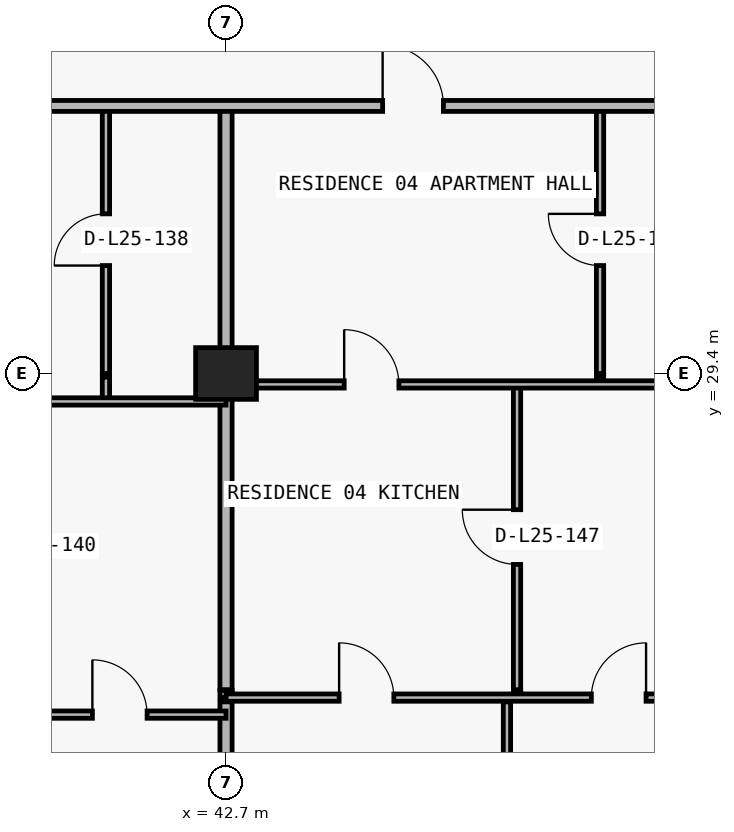
"""IFC4 building model, lengths in metres.
Left out: names, types, materials, properties, quantities, classifications, styles, units other than length and angle.
Written with IfcOpenShell. Run it as: python <this file> out.ifc"""

import sys

from ifc_helpers import new_model, si_unit, direction, frame, frame_2d, origin, origin_2d, place, context, subcontext, project, spatial, rectangle, extrude, element, fill, save


model = new_model("IFC4")
c1 = context("Model", 3, precision=1e-05, world=origin(), true_north=direction((0.0, 1.0)))
c2 = subcontext(c1, "Body", "Model", "MODEL_VIEW")
j1 = project(units=[si_unit("LENGTHUNIT", "METRE"), si_unit("PLANEANGLEUNIT", "RADIAN")], contexts=[c1])
p1 = place(None, origin())
s1 = spatial("IfcSite", under=j1, at=p1, CompositionType="ELEMENT")
p2 = place(p1, origin())
s2 = spatial("IfcBuilding", under=s1, at=p2, CompositionType="ELEMENT")
p3 = place(p2, frame((0.0, 0.0, 94.5)))
s3 = spatial("IfcBuildingStorey", under=s2, at=p3, CompositionType="ELEMENT", Elevation=94.5)
p4 = place(p3, frame((42.7, 29.4, 0.0), z_axis=(0.0, 0.0, 1.0), x_axis=(1.0, 0.0, 0.0)))
e1 = element("IfcColumn", 1, at=p4, inside=s3, PredefinedType="COLUMN", context=c2, shape_type="SweptSolid", body=[
    extrude(rectangle(XDim=1.0, YDim=0.85, at=origin_2d()), origin(), (0.0, 0.0, 1.0), 3.0),
])
p5 = place(p3, frame((40.725, 28.94, 0.0), z_axis=(0.0, 0.0, 1.0), x_axis=(0.0, 1.0, 0.0)))
e2 = element("IfcWall", 2, at=p5, inside=s3, PredefinedType="PARTITIONING", context=c2, shape_type="SweptSolid", body=[
    extrude(rectangle(XDim=0.4, YDim=0.12, at=frame_2d((0.2, 0.0))), origin(), (0.0, 0.0, 1.0), 2.629),
])
p6 = place(p3, frame((40.725, 29.4, 0.0), z_axis=(0.0, 0.0, 1.0), x_axis=(0.0, 1.0, 0.0)))
e3 = element("IfcWall", 3, at=p6, inside=s3, PredefinedType="PARTITIONING", context=c2, shape_type="SweptSolid", body=[
    extrude(rectangle(XDim=4.4, YDim=0.12, at=frame_2d((2.2, 0.0))), origin(), (0.0, 0.0, 1.0), 3.0),
])
p7 = place(p6, frame((1.775, 0.0, 0.0)))
e4 = element("IfcOpeningElement", 4, at=p7, cuts=e3, PredefinedType="OPENING", context=c2, shape_type="SweptSolid", body=[
    extrude(rectangle(XDim=0.85, YDim=2.1, at=frame_2d((0.425, 1.05))), frame((0.0, 0.07, 0.0), z_axis=(0.0, -1.0, 0.0), x_axis=(1.0, 0.0, 0.0)), (0.0, 0.0, 1.0), 0.14),
])
p8 = place(p3, frame((42.7, 8.84, 0.0), z_axis=(0.0, 0.0, 1.0), x_axis=(0.0, 1.0, 0.0)))
e5 = element("IfcWall", 5, at=p8, inside=s3, PredefinedType="PARTITIONING", context=c2, shape_type="SweptSolid", body=[
    extrude(rectangle(XDim=15.16, YDim=0.2, at=frame_2d((7.58, 0.0))), origin(), (0.0, 0.0, 1.0), 2.124),
])
p9 = place(p3, frame((42.7, 24.07, 0.0), z_axis=(0.0, 0.0, 1.0), x_axis=(0.0, 1.0, 0.0)))
e6 = element("IfcWall", 6, at=p9, inside=s3, PredefinedType="PARTITIONING", context=c2, shape_type="SweptSolid", body=[
    extrude(rectangle(XDim=0.12, YDim=0.2, at=frame_2d((0.06, 0.0))), origin(), (0.0, 0.0, 1.0), 2.124),
])
p10 = place(p3, frame((42.7, 24.2, 0.0), z_axis=(0.0, 0.0, 1.0), x_axis=(0.0, 1.0, 0.0)))
e7 = element("IfcWall", 7, at=p10, inside=s3, PredefinedType="PARTITIONING", context=c2, shape_type="SweptSolid", body=[
    extrude(rectangle(XDim=5.14, YDim=0.2, at=frame_2d((2.57, 0.0))), origin(), (0.0, 0.0, 1.0), 2.124),
])
p11 = place(p3, frame((42.7, 29.4, 0.0), z_axis=(0.0, 0.0, 1.0), x_axis=(0.0, 1.0, 0.0)))
e8 = element("IfcWall", 8, at=p11, inside=s3, PredefinedType="PARTITIONING", context=c2, shape_type="SweptSolid", body=[
    extrude(rectangle(XDim=4.4, YDim=0.2, at=frame_2d((2.2, 0.0))), origin(), (0.0, 0.0, 1.0), 2.124),
])
p12 = place(p3, frame((47.32, 8.84, 0.0), z_axis=(0.0, 0.0, 1.0), x_axis=(0.0, 1.0, 0.0)))
e9 = element("IfcWall", 9, at=p12, inside=s3, PredefinedType="PARTITIONING", context=c2, shape_type="SweptSolid", body=[
    extrude(rectangle(XDim=15.16, YDim=0.12, at=frame_2d((7.58, 0.0))), origin(), (0.0, 0.0, 1.0), 3.0),
])
p13 = place(p3, frame((47.486, 24.07, 0.0), z_axis=(0.0, 0.0, 1.0), x_axis=(0.0, 1.0, 0.0)))
e10 = element("IfcWall", 10, at=p13, inside=s3, PredefinedType="PARTITIONING", context=c2, shape_type="SweptSolid", body=[
    extrude(rectangle(XDim=0.12, YDim=0.12, at=frame_2d((0.06, 0.0))), origin(), (0.0, 0.0, 1.0), 3.0),
])
p14 = place(p3, frame((47.486, 24.2, 0.0), z_axis=(0.0, 0.0, 1.0), x_axis=(0.0, 1.0, 0.0)))
e11 = element("IfcWall", 11, at=p14, inside=s3, PredefinedType="PARTITIONING", context=c2, shape_type="SweptSolid", body=[
    extrude(rectangle(XDim=5.02, YDim=0.12, at=frame_2d((2.51, 0.0))), origin(), (0.0, 0.0, 1.0), 3.0),
])
p15 = place(p14, frame((2.06, 0.0, 0.0)))
e12 = element("IfcOpeningElement", 12, at=p15, cuts=e11, PredefinedType="OPENING", context=c2, shape_type="SweptSolid", body=[
    extrude(rectangle(XDim=0.9, YDim=2.15, at=frame_2d((0.45, 1.075))), frame((0.0, 0.07, 0.0), z_axis=(0.0, -1.0, 0.0), x_axis=(1.0, 0.0, 0.0)), (0.0, 0.0, 1.0), 0.14),
])
p16 = place(p3, frame((48.851, 29.22, 0.0), z_axis=(0.0, 0.0, 1.0), x_axis=(0.0, 1.0, 0.0)))
e13 = element("IfcWall", 13, at=p16, inside=s3, PredefinedType="PARTITIONING", context=c2, shape_type="SweptSolid", body=[
    extrude(rectangle(XDim=0.12, YDim=0.12, at=frame_2d((0.06, 0.0))), origin(), (0.0, 0.0, 1.0), 3.0),
])
p17 = place(p3, frame((48.851, 29.4, 0.0), z_axis=(0.0, 0.0, 1.0), x_axis=(0.0, 1.0, 0.0)))
e14 = element("IfcWall", 14, at=p17, inside=s3, PredefinedType="PARTITIONING", context=c2, shape_type="SweptSolid", body=[
    extrude(rectangle(XDim=4.4, YDim=0.12, at=frame_2d((2.2, 0.0))), origin(), (0.0, 0.0, 1.0), 3.0),
])
p18 = place(p17, frame((1.775, 0.0, 0.0)))
e15 = element("IfcOpeningElement", 15, at=p18, cuts=e14, PredefinedType="OPENING", context=c2, shape_type="SweptSolid", body=[
    extrude(rectangle(XDim=0.85, YDim=2.1, at=frame_2d((0.425, 1.05))), frame((0.0, 0.07, 0.0), z_axis=(0.0, -1.0, 0.0), x_axis=(1.0, 0.0, 0.0)), (0.0, 0.0, 1.0), 0.14),
])
p19 = place(p3, frame((35.1, 23.79, 0.0), z_axis=(0.0, 0.0, 1.0), x_axis=(1.0, 0.0, 0.0)))
e16 = element("IfcWall", 16, at=p19, inside=s3, PredefinedType="PARTITIONING", context=c2, shape_type="SweptSolid", body=[
    extrude(rectangle(XDim=7.6, YDim=0.12, at=frame_2d((3.8, 0.0))), origin(), (0.0, 0.0, 1.0), 3.0),
])
p20 = place(p19, frame((1.336, 0.0, 0.0)))
e17 = element("IfcOpeningElement", 17, at=p20, cuts=e16, PredefinedType="OPENING", context=c2, shape_type="SweptSolid", body=[
    extrude(rectangle(XDim=0.9, YDim=2.15, at=frame_2d((0.45, 1.075))), frame((0.0, 0.07, 0.0), z_axis=(0.0, -1.0, 0.0), x_axis=(1.0, 0.0, 0.0)), (0.0, 0.0, 1.0), 0.14),
])
p21 = place(p19, frame((5.402, 0.0, 0.0)))
e18 = element("IfcOpeningElement", 18, at=p21, cuts=e16, PredefinedType="OPENING", context=c2, shape_type="SweptSolid", body=[
    extrude(rectangle(XDim=0.9, YDim=2.15, at=frame_2d((0.45, 1.075))), frame((0.0, 0.07, 0.0), z_axis=(0.0, -1.0, 0.0), x_axis=(1.0, 0.0, 0.0)), (0.0, 0.0, 1.0), 0.14),
])
p22 = place(p3, frame((42.7, 24.07, 0.0), z_axis=(0.0, 0.0, 1.0), x_axis=(1.0, 0.0, 0.0)))
e19 = element("IfcWall", 19, at=p22, inside=s3, PredefinedType="PARTITIONING", context=c2, shape_type="SweptSolid", body=[
    extrude(rectangle(XDim=8.13, YDim=0.12, at=frame_2d((4.065, 0.0))), origin(), (0.0, 0.0, 1.0), 3.0),
])
p23 = place(p22, frame((1.86, 0.0, 0.0)))
e20 = element("IfcOpeningElement", 20, at=p23, cuts=e19, PredefinedType="OPENING", context=c2, shape_type="SweptSolid", body=[
    extrude(rectangle(XDim=0.9, YDim=2.15, at=frame_2d((0.45, 1.075))), frame((0.0, 0.07, 0.0), z_axis=(0.0, -1.0, 0.0), x_axis=(1.0, 0.0, 0.0)), (0.0, 0.0, 1.0), 0.14),
])
p24 = place(p22, frame((6.008, 0.0, 0.0)))
e21 = element("IfcOpeningElement", 21, at=p24, cuts=e19, PredefinedType="OPENING", context=c2, shape_type="SweptSolid", body=[
    extrude(rectangle(XDim=0.9, YDim=2.15, at=frame_2d((0.45, 1.075))), frame((0.0, 0.07, 0.0), z_axis=(0.0, -1.0, 0.0), x_axis=(1.0, 0.0, 0.0)), (0.0, 0.0, 1.0), 0.14),
])
p25 = place(p3, frame((35.1, 28.94, 0.0), z_axis=(0.0, 0.0, 1.0), x_axis=(1.0, 0.0, 0.0)))
e22 = element("IfcWall", 22, at=p25, inside=s3, PredefinedType="PARTITIONING", context=c2, shape_type="SweptSolid", body=[
    extrude(rectangle(XDim=7.6, YDim=0.12, at=frame_2d((3.8, 0.0))), origin(), (0.0, 0.0, 1.0), 3.0),
])
p26 = place(p25, frame((1.602, 0.0, 0.0)))
e23 = element("IfcOpeningElement", 23, at=p26, cuts=e22, PredefinedType="OPENING", context=c2, shape_type="SweptSolid", body=[
    extrude(rectangle(XDim=0.9, YDim=2.15, at=frame_2d((0.45, 1.075))), frame((0.0, 0.07, 0.0), z_axis=(0.0, -1.0, 0.0), x_axis=(1.0, 0.0, 0.0)), (0.0, 0.0, 1.0), 0.14),
])
p27 = place(p3, frame((42.7, 29.22, 0.0), z_axis=(0.0, 0.0, 1.0), x_axis=(1.0, 0.0, 0.0)))
e24 = element("IfcWall", 24, at=p27, inside=s3, PredefinedType="PARTITIONING", context=c2, shape_type="SweptSolid", body=[
    extrude(rectangle(XDim=8.13, YDim=0.12, at=frame_2d((4.065, 0.0))), origin(), (0.0, 0.0, 1.0), 2.124),
])
p28 = place(p27, frame((1.943, 0.0, 0.0)))
e25 = element("IfcOpeningElement", 25, at=p28, cuts=e24, PredefinedType="OPENING", context=c2, shape_type="SweptSolid", body=[
    extrude(rectangle(XDim=0.9, YDim=2.074, at=frame_2d((0.45, 1.037))), frame((0.0, 0.07, 0.0), z_axis=(0.0, -1.0, 0.0), x_axis=(1.0, 0.0, 0.0)), (0.0, 0.0, 1.0), 0.14),
])
p29 = place(p3, frame((18.3, 33.8, 0.0), z_axis=(0.0, 0.0, 1.0), x_axis=(1.0, 0.0, 0.0)))
e26 = element("IfcWall", 26, at=p29, inside=s3, PredefinedType="PARTITIONING", context=c2, shape_type="SweptSolid", body=[
    extrude(rectangle(XDim=41.2, YDim=0.18, at=frame_2d((20.6, 0.0))), origin(), (0.0, 0.0, 1.0), 3.0),
])
p30 = place(p29, frame((10.946, 0.0, 0.0)))
e27 = element("IfcOpeningElement", 27, at=p30, cuts=e26, PredefinedType="OPENING", context=c2, shape_type="SweptSolid", body=[
    extrude(rectangle(XDim=1.0, YDim=2.2, at=frame_2d((0.5, 1.1))), frame((0.0, 0.1, 0.0), z_axis=(0.0, -1.0, 0.0), x_axis=(1.0, 0.0, 0.0)), (0.0, 0.0, 1.0), 0.2),
])
p31 = place(p29, frame((19.113, 0.0, 0.0)))
e28 = element("IfcOpeningElement", 28, at=p31, cuts=e26, PredefinedType="OPENING", context=c2, shape_type="SweptSolid", body=[
    extrude(rectangle(XDim=1.0, YDim=2.2, at=frame_2d((0.5, 1.1))), frame((0.0, 0.1, 0.0), z_axis=(0.0, -1.0, 0.0), x_axis=(1.0, 0.0, 0.0)), (0.0, 0.0, 1.0), 0.2),
])
p32 = place(p29, frame((26.976, 0.0, 0.0)))
e29 = element("IfcOpeningElement", 29, at=p32, cuts=e26, PredefinedType="OPENING", context=c2, shape_type="SweptSolid", body=[
    extrude(rectangle(XDim=1.0, YDim=2.2, at=frame_2d((0.5, 1.1))), frame((0.0, 0.1, 0.0), z_axis=(0.0, -1.0, 0.0), x_axis=(1.0, 0.0, 0.0)), (0.0, 0.0, 1.0), 0.2),
])
p33 = place(p29, frame((35.47, 0.0, 0.0)))
e30 = element("IfcOpeningElement", 30, at=p33, cuts=e26, PredefinedType="OPENING", context=c2, shape_type="SweptSolid", body=[
    extrude(rectangle(XDim=1.0, YDim=2.2, at=frame_2d((0.5, 1.1))), frame((0.0, 0.1, 0.0), z_axis=(0.0, -1.0, 0.0), x_axis=(1.0, 0.0, 0.0)), (0.0, 0.0, 1.0), 0.2),
])
p34 = place(p7, origin())
e31 = element("IfcDoor", 31, at=p34, inside=s3, OperationType="SINGLE_SWING_LEFT", PredefinedType="DOOR", context=c2, shape_type="SweptSolid", body=[
    extrude(rectangle(XDim=0.85, YDim=2.1, at=frame_2d((0.425, 1.05))), frame((0.0, 0.025, 0.0), z_axis=(0.0, -1.0, 0.0), x_axis=(1.0, 0.0, 0.0)), (0.0, 0.0, 1.0), 0.05),
])
fill(e4, e31)
p35 = place(p21, origin())
e32 = element("IfcDoor", 32, at=p35, inside=s3, OperationType="SINGLE_SWING_LEFT", PredefinedType="DOOR", context=c2, shape_type="SweptSolid", body=[
    extrude(rectangle(XDim=0.9, YDim=2.15, at=frame_2d((0.45, 1.075))), frame((0.0, 0.025, 0.0), z_axis=(0.0, -1.0, 0.0), x_axis=(1.0, 0.0, 0.0)), (0.0, 0.0, 1.0), 0.05),
])
fill(e18, e32)
p36 = place(p32, origin())
e33 = element("IfcDoor", 33, at=p36, inside=s3, OperationType="SINGLE_SWING_LEFT", PredefinedType="DOOR", context=c2, shape_type="SweptSolid", body=[
    extrude(rectangle(XDim=1.0, YDim=2.2, at=frame_2d((0.5, 1.1))), frame((0.0, 0.025, 0.0), z_axis=(0.0, -1.0, 0.0), x_axis=(1.0, 0.0, 0.0)), (0.0, 0.0, 1.0), 0.05),
])
fill(e29, e33)
p37 = place(p18, origin())
e34 = element("IfcDoor", 34, at=p37, inside=s3, OperationType="SINGLE_SWING_RIGHT", PredefinedType="DOOR", context=c2, shape_type="SweptSolid", body=[
    extrude(rectangle(XDim=0.85, YDim=2.1, at=frame_2d((0.425, 1.05))), frame((0.0, 0.025, 0.0), z_axis=(0.0, -1.0, 0.0), x_axis=(1.0, 0.0, 0.0)), (0.0, 0.0, 1.0), 0.05),
])
fill(e15, e34)
p38 = place(p28, origin())
e35 = element("IfcDoor", 35, at=p38, inside=s3, OperationType="SINGLE_SWING_LEFT", PredefinedType="DOOR", context=c2, shape_type="SweptSolid", body=[
    extrude(rectangle(XDim=0.9, YDim=2.074, at=frame_2d((0.45, 1.037))), frame((0.0, 0.025, 0.0), z_axis=(0.0, -1.0, 0.0), x_axis=(1.0, 0.0, 0.0)), (0.0, 0.0, 1.0), 0.05),
])
fill(e25, e35)
p39 = place(p15, origin())
e36 = element("IfcDoor", 36, at=p39, inside=s3, OperationType="SINGLE_SWING_RIGHT", PredefinedType="DOOR", context=c2, shape_type="SweptSolid", body=[
    extrude(rectangle(XDim=0.9, YDim=2.15, at=frame_2d((0.45, 1.075))), frame((0.0, 0.025, 0.0), z_axis=(0.0, -1.0, 0.0), x_axis=(1.0, 0.0, 0.0)), (0.0, 0.0, 1.0), 0.05),
])
fill(e12, e36)
p40 = place(p23, origin())
e37 = element("IfcDoor", 37, at=p40, inside=s3, OperationType="SINGLE_SWING_LEFT", PredefinedType="DOOR", context=c2, shape_type="SweptSolid", body=[
    extrude(rectangle(XDim=0.9, YDim=2.15, at=frame_2d((0.45, 1.075))), frame((0.0, 0.025, 0.0), z_axis=(0.0, -1.0, 0.0), x_axis=(1.0, 0.0, 0.0)), (0.0, 0.0, 1.0), 0.05),
])
fill(e20, e37)
p41 = place(p24, origin())
e38 = element("IfcDoor", 38, at=p41, inside=s3, OperationType="SINGLE_SWING_RIGHT", PredefinedType="DOOR", context=c2, shape_type="SweptSolid", body=[
    extrude(rectangle(XDim=0.9, YDim=2.15, at=frame_2d((0.45, 1.075))), frame((0.0, 0.025, 0.0), z_axis=(0.0, -1.0, 0.0), x_axis=(1.0, 0.0, 0.0)), (0.0, 0.0, 1.0), 0.05),
])
fill(e21, e38)
save(model, sys.argv[1])
